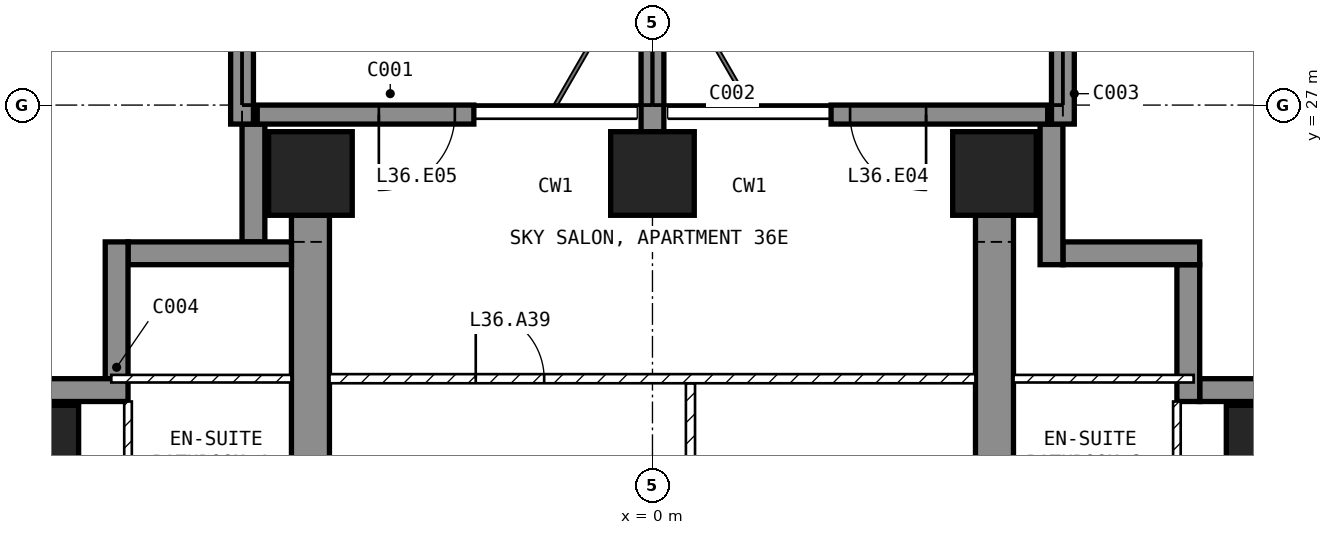
"""IFC4 building model, lengths in metres.
Left out: names, types, materials, properties, quantities, classifications, styles, units other than length and angle.
Written with IfcOpenShell. Run it as: python <this file> out.ifc"""

import sys

from ifc_helpers import new_model, si_unit, direction, frame, frame_2d, origin, origin_2d, place, context, subcontext, project, spatial, polyline, rectangle, outline, extrude, element, fill, save


model = new_model("IFC4")
c1 = context("Model", 3, precision=1e-05, world=origin(), true_north=direction((0.0, 1.0)))
c2 = subcontext(c1, "Body", "Model", "MODEL_VIEW")
j1 = project(units=[si_unit("LENGTHUNIT", "METRE"), si_unit("PLANEANGLEUNIT", "RADIAN")], contexts=[c1])
p1 = place(None, origin())
s1 = spatial("IfcSite", under=j1, at=p1, CompositionType="ELEMENT")
p2 = place(p1, origin())
s2 = spatial("IfcBuilding", under=s1, at=p2, CompositionType="ELEMENT")
p3 = place(p2, frame((0.0, 0.0, 147.9)))
s3 = spatial("IfcBuildingStorey", under=s2, at=p3, CompositionType="ELEMENT", Elevation=147.9)
for number, where, z_axis, x_axis in (
    (1, (-8.1, 22.5, -0.25), (0.0, 0.0, 1.0), (1.0, 0.0, 0.0)),
    (2, (-4.5, 26.1, -0.25), (0.0, 0.0, 1.0), (1.0, 0.0, 0.0)),
    (3, (0.0, 26.1, -0.25), (0.0, 0.0, 1.0), (1.0, 0.0, 0.0)),
    (4, (4.5, 26.1, -0.25), (0.0, 0.0, 1.0), (1.0, 0.0, 0.0)),
    (5, (8.1, 22.5, -0.25), (0.0, 0.0, 1.0), (1.0, 0.0, 0.0)),
):
    element("IfcColumn", number, at=place(p3, frame(where, z_axis=z_axis, x_axis=x_axis)), inside=s3, PredefinedType="COLUMN", context=c2, shape_type="SweptSolid", body=[
        extrude(rectangle(XDim=1.1, YDim=1.1, at=origin_2d()), origin(), (0.0, 0.0, 1.0), 3.5),
    ])
for number, where, z_axis, x_axis in (
    (6, (-4.75, 9.0, -0.25), (1.0, 0.0, 0.0), (0.0, 1.0, 0.0)),
    (7, (4.25, 9.0, -0.25), (1.0, 0.0, 0.0), (0.0, 1.0, 0.0)),
):
    element("IfcWall", number, at=place(p3, frame(where, z_axis=z_axis, x_axis=x_axis)), inside=s3, PredefinedType="SHEAR", context=c2, shape_type="SweptSolid", body=[
        extrude(outline(polyline([(0.0, 0.0), (2.1, 0.0), (2.1, 2.65), (4.5, 2.65), (4.5, 0.0), (9.9, 0.0), (9.9, 2.65), (12.3, 2.65), (12.3, 0.0), (16.55, 0.0), (16.55, 3.5), (0.0, 3.5), (0.0, 0.0)])), origin(), (0.0, 0.0, 1.0), 0.5),
    ])
p4 = place(p3, frame((5.2, 26.875, 0.0), z_axis=(0.0, 0.0, 1.0), x_axis=(-1.0, 0.0, 0.0)))
e8 = element("IfcWall", 8, at=p4, inside=s3, PredefinedType="SOLIDWALL", context=c2, shape_type="SweptSolid", body=[
    extrude(rectangle(XDim=2.85, YDim=0.25, at=frame_2d((1.425, 0.0))), origin(), (0.0, 0.0, 1.0), 3.25),
])
p5 = place(p4, frame((1.6, 0.0, 0.0)))
e9 = element("IfcOpeningElement", 9, at=p5, cuts=e8, PredefinedType="OPENING", context=c2, shape_type="SweptSolid", body=[
    extrude(rectangle(XDim=1.0, YDim=2.4, at=frame_2d((0.5, 1.2))), frame((0.0, 0.135, 0.0), z_axis=(0.0, -1.0, 0.0), x_axis=(1.0, 0.0, 0.0)), (0.0, 0.0, 1.0), 0.27),
])
p6 = place(p3, frame((-2.35, 26.875, 0.0), z_axis=(0.0, 0.0, 1.0), x_axis=(-1.0, 0.0, 0.0)))
e10 = element("IfcWall", 10, at=p6, inside=s3, PredefinedType="SOLIDWALL", context=c2, shape_type="SweptSolid", body=[
    extrude(rectangle(XDim=2.85, YDim=0.25, at=frame_2d((1.425, 0.0))), origin(), (0.0, 0.0, 1.0), 3.25),
])
p7 = place(p6, frame((0.25, 0.0, 0.0)))
e11 = element("IfcOpeningElement", 11, at=p7, cuts=e10, PredefinedType="OPENING", context=c2, shape_type="SweptSolid", body=[
    extrude(rectangle(XDim=1.0, YDim=2.4, at=frame_2d((0.5, 1.2))), frame((0.0, 0.135, 0.0), z_axis=(0.0, -1.0, 0.0), x_axis=(1.0, 0.0, 0.0)), (0.0, 0.0, 1.0), 0.27),
])
p8 = place(p3, frame((8.75, 23.25, 0.0), z_axis=(0.0, 0.0, 1.0), x_axis=(-1.0, 0.0, 0.0)))
e12 = element("IfcWall", 12, at=p8, inside=s3, PredefinedType="SOLIDWALL", context=c2, shape_type="SweptSolid", body=[
    extrude(rectangle(XDim=1.55, YDim=0.3, at=frame_2d((0.775, 0.0))), origin(), (0.0, 0.0, 1.0), 3.25),
])
p9 = place(p3, frame((7.05, 23.1, 0.0), z_axis=(0.0, 0.0, 1.0), x_axis=(0.0, 1.0, 0.0)))
e13 = element("IfcWall", 13, at=p9, inside=s3, PredefinedType="SOLIDWALL", context=c2, shape_type="SweptSolid", body=[
    extrude(rectangle(XDim=1.8, YDim=0.3, at=frame_2d((0.9, 0.0))), origin(), (0.0, 0.0, 1.0), 3.25),
])
p10 = place(p3, frame((7.2, 25.05, 0.0), z_axis=(0.0, 0.0, 1.0), x_axis=(-1.0, 0.0, 0.0)))
e14 = element("IfcWall", 14, at=p10, inside=s3, PredefinedType="SOLIDWALL", context=c2, shape_type="SweptSolid", body=[
    extrude(rectangle(XDim=1.8, YDim=0.3, at=frame_2d((0.9, 0.0))), origin(), (0.0, 0.0, 1.0), 3.25),
])
p11 = place(p3, frame((5.25, 24.9, 0.0), z_axis=(0.0, 0.0, 1.0), x_axis=(0.0, 1.0, 0.0)))
e15 = element("IfcWall", 15, at=p11, inside=s3, PredefinedType="SOLIDWALL", context=c2, shape_type="SweptSolid", body=[
    extrude(rectangle(XDim=1.85, YDim=0.3, at=frame_2d((0.925, 0.0))), origin(), (0.0, 0.0, 1.0), 3.25),
])
p12 = place(p3, frame((-5.25, 26.75, 0.0), z_axis=(0.0, 0.0, 1.0), x_axis=(0.0, -1.0, 0.0)))
e16 = element("IfcWall", 16, at=p12, inside=s3, PredefinedType="SOLIDWALL", context=c2, shape_type="SweptSolid", body=[
    extrude(rectangle(XDim=1.55, YDim=0.3, at=frame_2d((0.775, 0.0))), origin(), (0.0, 0.0, 1.0), 3.25),
])
p13 = place(p3, frame((-4.75, 25.05, 0.0), z_axis=(0.0, 0.0, 1.0), x_axis=(-1.0, 0.0, 0.0)))
e17 = element("IfcWall", 17, at=p13, inside=s3, PredefinedType="SOLIDWALL", context=c2, shape_type="SweptSolid", body=[
    extrude(rectangle(XDim=2.15, YDim=0.3, at=frame_2d((1.075, 0.0))), origin(), (0.0, 0.0, 1.0), 3.25),
])
p14 = place(p3, frame((-7.05, 25.2, 0.0), z_axis=(0.0, 0.0, 1.0), x_axis=(0.0, -1.0, 0.0)))
e18 = element("IfcWall", 18, at=p14, inside=s3, PredefinedType="SOLIDWALL", context=c2, shape_type="SweptSolid", body=[
    extrude(rectangle(XDim=1.8, YDim=0.3, at=frame_2d((0.9, 0.0))), origin(), (0.0, 0.0, 1.0), 3.25),
])
p15 = place(p3, frame((-6.9, 23.25, 0.0), z_axis=(0.0, 0.0, 1.0), x_axis=(-1.0, 0.0, 0.0)))
e19 = element("IfcWall", 19, at=p15, inside=s3, PredefinedType="SOLIDWALL", context=c2, shape_type="SweptSolid", body=[
    extrude(rectangle(XDim=1.85, YDim=0.3, at=frame_2d((0.925, 0.0))), origin(), (0.0, 0.0, 1.0), 3.25),
])
p16 = place(p3, frame((-5.4, 26.75, 0.0), z_axis=(0.0, 0.0, 1.0), x_axis=(0.0, 1.0, 0.0)))
e20 = element("IfcWall", 20, at=p16, inside=s3, PredefinedType="SOLIDWALL", context=c2, shape_type="SweptSolid", body=[
    extrude(rectangle(XDim=2.95, YDim=0.3, at=frame_2d((1.475, 0.0))), origin(), (0.0, 0.0, 1.0), 3.25),
])
p17 = place(p3, frame((0.0, 26.65, 0.0), z_axis=(0.0, 0.0, 1.0), x_axis=(0.0, 1.0, 0.0)))
e21 = element("IfcWall", 21, at=p17, inside=s3, PredefinedType="SOLIDWALL", context=c2, shape_type="SweptSolid", body=[
    extrude(rectangle(XDim=3.05, YDim=0.3, at=frame_2d((1.525, 0.0))), origin(), (0.0, 0.0, 1.0), 3.25),
])
p18 = place(p3, frame((5.4, 26.75, 0.0), z_axis=(0.0, 0.0, 1.0), x_axis=(0.0, 1.0, 0.0)))
e22 = element("IfcWall", 22, at=p18, inside=s3, PredefinedType="SOLIDWALL", context=c2, shape_type="SweptSolid", body=[
    extrude(rectangle(XDim=2.95, YDim=0.3, at=frame_2d((1.475, 0.0))), origin(), (0.0, 0.0, 1.0), 3.25),
])
p19 = place(p3, frame((0.5, 23.34, 0.0), z_axis=(0.0, 0.0, 1.0), x_axis=(0.0, -1.0, 0.0)))
e23 = element("IfcWall", 23, at=p19, inside=s3, PredefinedType="PARTITIONING", context=c2, shape_type="SweptSolid", body=[
    extrude(rectangle(XDim=4.38, YDim=0.12, at=frame_2d((2.19, 0.0))), origin(), (0.0, 0.0, 1.0), 3.25),
])
p20 = place(p19, frame((1.74, 0.0, 0.0)))
e24 = element("IfcOpeningElement", 24, at=p20, cuts=e23, PredefinedType="OPENING", context=c2, shape_type="SweptSolid", body=[
    extrude(rectangle(XDim=0.9, YDim=2.1, at=frame_2d((0.45, 1.05))), frame((0.0, 0.07, 0.0), z_axis=(0.0, -1.0, 0.0), x_axis=(1.0, 0.0, 0.0)), (0.0, 0.0, 1.0), 0.14),
])
p21 = place(p3, frame((-4.25, 23.4, 0.0), z_axis=(0.0, 0.0, 1.0), x_axis=(1.0, 0.0, 0.0)))
e25 = element("IfcWall", 25, at=p21, inside=s3, PredefinedType="PARTITIONING", context=c2, shape_type="SweptSolid", body=[
    extrude(rectangle(XDim=8.5, YDim=0.12, at=frame_2d((4.25, 0.0))), origin(), (0.0, 0.0, 1.0), 3.25),
])
p22 = place(p21, frame((1.925, 0.0, 0.0)))
e26 = element("IfcOpeningElement", 26, at=p22, cuts=e25, PredefinedType="OPENING", context=c2, shape_type="SweptSolid", body=[
    extrude(rectangle(XDim=0.9, YDim=2.1, at=frame_2d((0.45, 1.05))), frame((0.0, 0.07, 0.0), z_axis=(0.0, -1.0, 0.0), x_axis=(1.0, 0.0, 0.0)), (0.0, 0.0, 1.0), 0.14),
])
p23 = place(p3, frame((6.9, 20.45, 0.0), z_axis=(0.0, 0.0, 1.0), x_axis=(0.0, 1.0, 0.0)))
e27 = element("IfcWall", 27, at=p23, inside=s3, PredefinedType="PARTITIONING", context=c2, shape_type="SweptSolid", body=[
    extrude(rectangle(XDim=2.65, YDim=0.1, at=frame_2d((1.325, 0.0))), origin(), (0.0, 0.0, 1.0), 3.25),
])
p24 = place(p3, frame((4.75, 23.4, 0.0), z_axis=(0.0, 0.0, 1.0), x_axis=(1.0, 0.0, 0.0)))
e28 = element("IfcWall", 28, at=p24, inside=s3, PredefinedType="PARTITIONING", context=c2, shape_type="SweptSolid", body=[
    extrude(rectangle(XDim=2.37, YDim=0.1, at=frame_2d((1.185, 0.0))), origin(), (0.0, 0.0, 1.0), 3.25),
])
p25 = place(p3, frame((-6.9, 23.1, 0.0), z_axis=(0.0, 0.0, 1.0), x_axis=(0.0, -1.0, 0.0)))
e29 = element("IfcWall", 29, at=p25, inside=s3, PredefinedType="PARTITIONING", context=c2, shape_type="SweptSolid", body=[
    extrude(rectangle(XDim=2.65, YDim=0.1, at=frame_2d((1.325, 0.0))), origin(), (0.0, 0.0, 1.0), 3.25),
])
p26 = place(p3, frame((-7.12, 23.4, 0.0), z_axis=(0.0, 0.0, 1.0), x_axis=(1.0, 0.0, 0.0)))
e30 = element("IfcWall", 30, at=p26, inside=s3, PredefinedType="PARTITIONING", context=c2, shape_type="SweptSolid", body=[
    extrude(rectangle(XDim=2.37, YDim=0.1, at=frame_2d((1.185, 0.0))), origin(), (0.0, 0.0, 1.0), 3.25),
])
p27 = place(p5, origin())
e31 = element("IfcDoor", 31, at=p27, inside=s3, OperationType="SINGLE_SWING_LEFT", PredefinedType="DOOR", context=c2, shape_type="SweptSolid", body=[
    extrude(rectangle(XDim=1.0, YDim=2.4, at=frame_2d((0.5, 1.2))), frame((0.0, 0.025, 0.0), z_axis=(0.0, -1.0, 0.0), x_axis=(1.0, 0.0, 0.0)), (0.0, 0.0, 1.0), 0.05),
])
fill(e9, e31)
p28 = place(p7, origin())
e32 = element("IfcDoor", 32, at=p28, inside=s3, OperationType="SINGLE_SWING_RIGHT", PredefinedType="DOOR", context=c2, shape_type="SweptSolid", body=[
    extrude(rectangle(XDim=1.0, YDim=2.4, at=frame_2d((0.5, 1.2))), frame((0.0, 0.025, 0.0), z_axis=(0.0, -1.0, 0.0), x_axis=(1.0, 0.0, 0.0)), (0.0, 0.0, 1.0), 0.05),
])
fill(e11, e32)
p29 = place(p22, origin())
e33 = element("IfcDoor", 33, at=p29, inside=s3, OperationType="SINGLE_SWING_LEFT", PredefinedType="DOOR", context=c2, shape_type="SweptSolid", body=[
    extrude(rectangle(XDim=0.9, YDim=2.1, at=frame_2d((0.45, 1.05))), frame((0.0, 0.025, 0.0), z_axis=(0.0, -1.0, 0.0), x_axis=(1.0, 0.0, 0.0)), (0.0, 0.0, 1.0), 0.05),
])
fill(e26, e33)
save(model, sys.argv[1])
